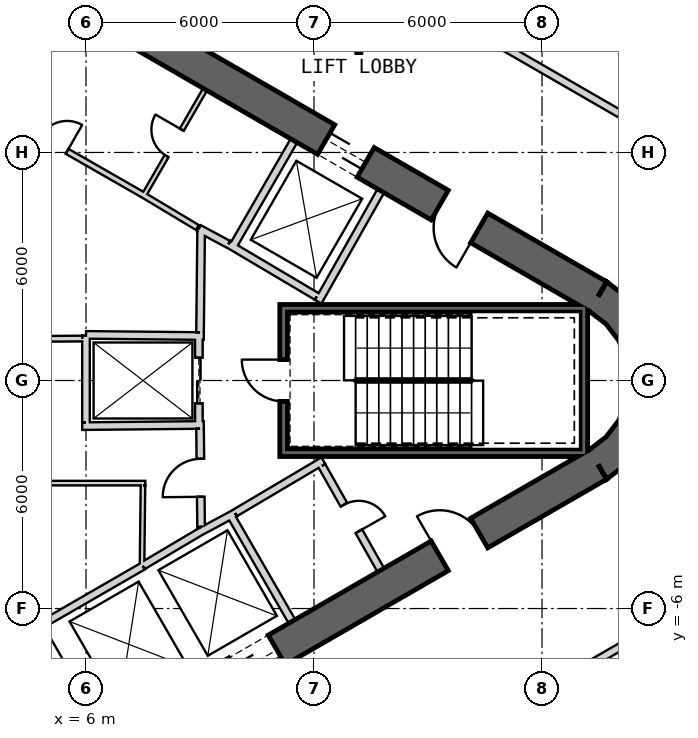
"""IFC4 building model, lengths in metres.
Left out: names, types, materials, properties, quantities, classifications, styles, units other than length and angle.
Written with IfcOpenShell. Run it as: python <this file> out.ifc"""

import sys

from ifc_helpers import new_model, si_unit, direction, frame, frame_2d, origin, place, context, subcontext, project, spatial, polyline, rectangle, outline, extrude, element, fill, save


model = new_model("IFC4")
c1 = context("Model", 3, precision=1e-05, world=origin(), true_north=direction((0.0, 1.0)))
c2 = subcontext(c1, "Body", "Model", "MODEL_VIEW")
j1 = project(units=[si_unit("LENGTHUNIT", "METRE"), si_unit("PLANEANGLEUNIT", "RADIAN")], contexts=[c1])
p1 = place(None, origin())
s1 = spatial("IfcSite", under=j1, at=p1, CompositionType="ELEMENT")
p2 = place(p1, origin())
s2 = spatial("IfcBuilding", under=s1, at=p2, CompositionType="ELEMENT")
p3 = place(p2, frame((0.0, 0.0, 265.2)))
s3 = spatial("IfcBuildingStorey", under=s2, at=p3, CompositionType="ELEMENT", Elevation=265.2)
p4 = place(p3, frame((19.475, 2.208, 0.0), z_axis=(0.0, 0.0, 1.0), x_axis=(-0.866028369851, 0.499994862586, 0.0)))
e1 = element("IfcWall", 1, at=p4, inside=s3, PredefinedType="SHEAR", context=c2, shape_type="SweptSolid", body=[
    extrude(rectangle(XDim=31.523, YDim=0.9, at=frame_2d((15.762, 0.0))), origin(), (0.0, 0.0, 1.0), 4.0),
])
p5 = place(p4, frame((7.062, 0.0, 0.0)))
e2 = element("IfcOpeningElement", 2, at=p5, cuts=e1, PredefinedType="OPENING", context=c2, shape_type="SweptSolid", body=[
    extrude(rectangle(XDim=1.2, YDim=2.4, at=frame_2d((0.6, 1.2))), frame((0.0, 0.46, 0.0), z_axis=(0.0, -1.0, 0.0), x_axis=(1.0, 0.0, 0.0)), (0.0, 0.0, 1.0), 0.92),
])
p6 = place(p4, frame((3.612, 0.0, 0.0)))
e3 = element("IfcOpeningElement", 3, at=p6, cuts=e1, PredefinedType="OPENING", context=c2, shape_type="SweptSolid", body=[
    extrude(rectangle(XDim=1.2, YDim=2.4, at=frame_2d((0.6, 1.2))), frame((0.0, 0.46, 0.0), z_axis=(0.0, -1.0, 0.0), x_axis=(1.0, 0.0, 0.0)), (0.0, 0.0, 1.0), 0.92),
])
p7 = place(p4, frame((26.712, 0.0, 0.0)))
e4 = element("IfcOpeningElement", 4, at=p7, cuts=e1, PredefinedType="OPENING", context=c2, shape_type="SweptSolid", body=[
    extrude(rectangle(XDim=1.2, YDim=2.4, at=frame_2d((0.6, 1.2))), frame((0.0, 0.46, 0.0), z_axis=(0.0, -1.0, 0.0), x_axis=(1.0, 0.0, 0.0)), (0.0, 0.0, 1.0), 0.92),
])
p8 = place(p3, frame((-7.825, -17.97, 0.0), z_axis=(0.0, 0.0, 1.0), x_axis=(0.866028369851, 0.499994862586, 0.0)))
e5 = element("IfcWall", 5, at=p8, inside=s3, PredefinedType="SHEAR", context=c2, shape_type="SweptSolid", body=[
    extrude(rectangle(XDim=31.523, YDim=0.9, at=frame_2d((15.762, 0.0))), origin(), (0.0, 0.0, 1.0), 4.0),
])
p9 = place(p8, frame((7.062, 0.0, 0.0)))
e6 = element("IfcOpeningElement", 6, at=p9, cuts=e5, PredefinedType="OPENING", context=c2, shape_type="SweptSolid", body=[
    extrude(rectangle(XDim=1.2, YDim=2.4, at=frame_2d((0.6, 1.2))), frame((0.0, 0.46, 0.0), z_axis=(0.0, -1.0, 0.0), x_axis=(1.0, 0.0, 0.0)), (0.0, 0.0, 1.0), 0.92),
])
p10 = place(p8, frame((9.762, 0.0, 0.0)))
e7 = element("IfcOpeningElement", 7, at=p10, cuts=e5, PredefinedType="OPENING", context=c2, shape_type="SweptSolid", body=[
    extrude(rectangle(XDim=1.2, YDim=2.4, at=frame_2d((0.6, 1.2))), frame((0.0, 0.46, 0.0), z_axis=(0.0, -1.0, 0.0), x_axis=(1.0, 0.0, 0.0)), (0.0, 0.0, 1.0), 0.92),
])
p11 = place(p8, frame((12.462, 0.0, 0.0)))
e8 = element("IfcOpeningElement", 8, at=p11, cuts=e5, PredefinedType="OPENING", context=c2, shape_type="SweptSolid", body=[
    extrude(rectangle(XDim=1.2, YDim=2.4, at=frame_2d((0.6, 1.2))), frame((0.0, 0.46, 0.0), z_axis=(0.0, -1.0, 0.0), x_axis=(1.0, 0.0, 0.0)), (0.0, 0.0, 1.0), 0.92),
])
p12 = place(p8, frame((15.162, 0.0, 0.0)))
e9 = element("IfcOpeningElement", 9, at=p12, cuts=e5, PredefinedType="OPENING", context=c2, shape_type="SweptSolid", body=[
    extrude(rectangle(XDim=1.2, YDim=2.4, at=frame_2d((0.6, 1.2))), frame((0.0, 0.46, 0.0), z_axis=(0.0, -1.0, 0.0), x_axis=(1.0, 0.0, 0.0)), (0.0, 0.0, 1.0), 0.92),
])
p13 = place(p8, frame((17.862, 0.0, 0.0)))
e10 = element("IfcOpeningElement", 10, at=p13, cuts=e5, PredefinedType="OPENING", context=c2, shape_type="SweptSolid", body=[
    extrude(rectangle(XDim=1.2, YDim=2.4, at=frame_2d((0.6, 1.2))), frame((0.0, 0.46, 0.0), z_axis=(0.0, -1.0, 0.0), x_axis=(1.0, 0.0, 0.0)), (0.0, 0.0, 1.0), 0.92),
])
p14 = place(p8, frame((20.562, 0.0, 0.0)))
e11 = element("IfcOpeningElement", 11, at=p14, cuts=e5, PredefinedType="OPENING", context=c2, shape_type="SweptSolid", body=[
    extrude(rectangle(XDim=1.2, YDim=2.4, at=frame_2d((0.6, 1.2))), frame((0.0, 0.46, 0.0), z_axis=(0.0, -1.0, 0.0), x_axis=(1.0, 0.0, 0.0)), (0.0, 0.0, 1.0), 0.92),
])
p15 = place(p8, frame((26.712, 0.0, 0.0)))
e12 = element("IfcOpeningElement", 12, at=p15, cuts=e5, PredefinedType="OPENING", context=c2, shape_type="SweptSolid", body=[
    extrude(rectangle(XDim=1.2, YDim=2.4, at=frame_2d((0.6, 1.2))), frame((0.0, 0.46, 0.0), z_axis=(0.0, -1.0, 0.0), x_axis=(1.0, 0.0, 0.0)), (0.0, 0.0, 1.0), 0.92),
])
p16 = place(p8, frame((3.612, 0.0, 0.0)))
e13 = element("IfcOpeningElement", 13, at=p16, cuts=e5, PredefinedType="OPENING", context=c2, shape_type="SweptSolid", body=[
    extrude(rectangle(XDim=1.2, YDim=2.4, at=frame_2d((0.6, 1.2))), frame((0.0, 0.46, 0.0), z_axis=(0.0, -1.0, 0.0), x_axis=(1.0, 0.0, 0.0)), (0.0, 0.0, 1.0), 0.92),
])
p17 = place(p3, origin())
e14 = element("IfcWall", 14, at=p17, inside=s3, PredefinedType="SHEAR", context=c2, shape_type="SweptSolid", body=[
    extrude(outline(polyline([(19.7, -2.598), (20.321, -2.121), (20.798, -1.5), (21.098, -0.777), (21.2, 0.0), (21.098, 0.777), (20.798, 1.5), (20.321, 2.121), (19.7, 2.598), (19.25, 1.819), (19.685, 1.485), (20.019, 1.05), (20.229, 0.543), (20.3, 0.0), (20.229, -0.543), (20.019, -1.05), (19.685, -1.485), (19.25, -1.819), (19.7, -2.598)])), origin(), (0.0, 0.0, 1.0), 4.0),
])
p18 = place(p3, frame((9.847, 3.495, 0.0), z_axis=(0.0, 0.0, 1.0), x_axis=(0.499984717929, 0.866034226713, 0.0)))
e15 = element("IfcWall", 15, at=p18, inside=s3, PredefinedType="PLUMBINGWALL", context=c2, shape_type="SweptSolid", body=[
    extrude(rectangle(XDim=3.25, YDim=0.2, at=frame_2d((1.625, 0.0))), origin(), (0.0, 0.0, 1.0), 3.7),
])
p19 = place(p3, frame((12.11, 2.073, 0.0), z_axis=(0.0, 0.0, 1.0), x_axis=(0.49196600604, 0.870614408852, 0.0)))
e16 = element("IfcWall", 16, at=p19, inside=s3, PredefinedType="PLUMBINGWALL", context=c2, shape_type="SweptSolid", body=[
    extrude(rectangle(XDim=3.35, YDim=0.2, at=frame_2d((1.675, 0.0))), origin(), (0.0, 0.0, 1.0), 3.7),
])
p20 = place(p3, frame((12.073, 2.211, 0.0), z_axis=(0.0, 0.0, 1.0), x_axis=(-0.860414880418, 0.509594185166, 0.0)))
e17 = element("IfcWall", 17, at=p20, inside=s3, PredefinedType="PLUMBINGWALL", context=c2, shape_type="SweptSolid", body=[
    extrude(rectangle(XDim=2.7, YDim=0.2, at=frame_2d((1.35, 0.0))), origin(), (0.0, 0.0, 1.0), 3.7),
])
p21 = place(p3, frame((0.483, -8.936, 0.0), z_axis=(0.0, 0.0, 1.0), x_axis=(0.866030989016, 0.499990325971, 0.0)))
e18 = element("IfcWall", 18, at=p21, inside=s3, PredefinedType="PLUMBINGWALL", context=c2, shape_type="SweptSolid", body=[
    extrude(rectangle(XDim=8.1, YDim=0.2, at=frame_2d((4.05, 0.0))), origin(), (0.0, 0.0, 1.0), 3.7),
])
p22 = place(p3, frame((9.795, -3.525, 0.0), z_axis=(0.0, 0.0, 1.0), x_axis=(0.499984717929, -0.866034226713, 0.0)))
e19 = element("IfcWall", 19, at=p22, inside=s3, PredefinedType="PLUMBINGWALL", context=c2, shape_type="SweptSolid", body=[
    extrude(rectangle(XDim=3.25, YDim=0.2, at=frame_2d((1.625, 0.0))), origin(), (0.0, 0.0, 1.0), 3.7),
])
p23 = place(p3, frame((8.974, -3.999, 0.0), z_axis=(0.0, 0.0, 1.0), x_axis=(0.880907015104, 0.473289373154, 0.0)))
e20 = element("IfcWall", 20, at=p23, inside=s3, PredefinedType="PLUMBINGWALL", context=c2, shape_type="SweptSolid", body=[
    extrude(rectangle(XDim=1.078, YDim=0.2, at=frame_2d((0.539, 0.0))), origin(), (0.0, 0.0, 1.0), 3.7),
])
p24 = place(p3, frame((7.493, -4.878, 0.0), z_axis=(0.0, 0.0, 1.0), x_axis=(0.859981807212, 0.510324691999, 0.0)))
e21 = element("IfcWall", 21, at=p24, inside=s3, PredefinedType="PLUMBINGWALL", context=c2, shape_type="SweptSolid", body=[
    extrude(rectangle(XDim=1.845, YDim=0.2, at=frame_2d((0.922, 0.0))), origin(), (0.0, 0.0, 1.0), 3.7),
])
p25 = place(p3, frame((19.2, 1.9, -0.3), z_axis=(0.0, 0.0, 1.0), x_axis=(-1.0, 0.0, 0.0)))
e22 = element("IfcWall", 22, at=p25, inside=s3, PredefinedType="SHEAR", context=c2, shape_type="SweptSolid", body=[
    extrude(rectangle(XDim=8.1, YDim=0.2, at=frame_2d((4.05, 0.0))), origin(), (0.0, 0.0, 1.0), 4.0),
])
p26 = place(p3, frame((19.1, -2.0, -0.3), z_axis=(0.0, 0.0, 1.0), x_axis=(0.0, 1.0, 0.0)))
e23 = element("IfcWall", 23, at=p26, inside=s3, PredefinedType="SHEAR", context=c2, shape_type="SweptSolid", body=[
    extrude(rectangle(XDim=3.8, YDim=0.2, at=frame_2d((1.9, 0.0))), origin(), (0.0, 0.0, 1.0), 4.0),
])
p27 = place(p3, frame((11.1, -1.9, -0.3), z_axis=(0.0, 0.0, 1.0), x_axis=(1.0, 0.0, 0.0)))
e24 = element("IfcWall", 24, at=p27, inside=s3, PredefinedType="SHEAR", context=c2, shape_type="SweptSolid", body=[
    extrude(rectangle(XDim=7.9, YDim=0.2, at=frame_2d((3.95, 0.0))), origin(), (0.0, 0.0, 1.0), 4.0),
])
p28 = place(p3, frame((11.2, -1.8, -0.3), z_axis=(0.0, 0.0, 1.0), x_axis=(0.0, 1.0, 0.0)))
e25 = element("IfcWall", 25, at=p28, inside=s3, PredefinedType="SHEAR", context=c2, shape_type="SweptSolid", body=[
    extrude(rectangle(XDim=3.6, YDim=0.2, at=frame_2d((1.8, 0.0))), origin(), (0.0, 0.0, 1.0), 4.0),
])
p29 = place(p28, frame((1.25, 0.0, 0.3)))
e26 = element("IfcOpeningElement", 26, at=p29, cuts=e25, PredefinedType="OPENING", context=c2, shape_type="SweptSolid", body=[
    extrude(rectangle(XDim=1.1, YDim=2.1, at=frame_2d((0.55, 1.05))), frame((0.0, 0.11, 0.0), z_axis=(0.0, -1.0, 0.0), x_axis=(1.0, 0.0, 0.0)), (0.0, 0.0, 1.0), 0.22),
])
p30 = place(p3, frame((8.97, 1.2, 0.0), z_axis=(0.0, 0.0, 1.0), x_axis=(0.0, -1.0, 0.0)))
e27 = element("IfcWall", 27, at=p30, inside=s3, PredefinedType="PLUMBINGWALL", context=c2, shape_type="SweptSolid", body=[
    extrude(rectangle(XDim=2.4, YDim=0.2, at=frame_2d((1.2, 0.0))), origin(), (0.0, 0.0, 1.0), 3.7),
])
p31 = place(p30, frame((0.6, 0.0, 0.0)))
e28 = element("IfcOpeningElement", 28, at=p31, cuts=e27, PredefinedType="OPENING", context=c2, shape_type="SweptSolid", body=[
    extrude(rectangle(XDim=1.2, YDim=2.4, at=frame_2d((0.6, 1.2))), frame((0.0, 0.11, 0.0), z_axis=(0.0, -1.0, 0.0), x_axis=(1.0, 0.0, 0.0)), (0.0, 0.0, 1.0), 0.22),
])
p32 = place(p3, frame((6.0, 1.2, 0.0), z_axis=(0.0, 0.0, 1.0), x_axis=(0.999949988, -0.010001074852, 0.0)))
e29 = element("IfcWall", 29, at=p32, inside=s3, PredefinedType="PLUMBINGWALL", context=c2, shape_type="SweptSolid", body=[
    extrude(rectangle(XDim=3.1, YDim=0.2, at=frame_2d((1.55, 0.0))), origin(), (0.0, 0.0, 1.0), 3.7),
])
p33 = place(p3, frame((5.9, -1.201, 0.0), z_axis=(0.0, 0.0, 1.0), x_axis=(0.999950064753, 0.009993397809, 0.0)))
e30 = element("IfcWall", 30, at=p33, inside=s3, PredefinedType="PLUMBINGWALL", context=c2, shape_type="SweptSolid", body=[
    extrude(rectangle(XDim=3.2, YDim=0.2, at=frame_2d((1.6, 0.0))), origin(), (0.0, 0.0, 1.0), 3.7),
])
p34 = place(p3, frame((6.0, -1.1, 0.0), z_axis=(0.0, 0.0, 1.0), x_axis=(0.0, 1.0, 0.0)))
e31 = element("IfcWall", 31, at=p34, inside=s3, PredefinedType="PLUMBINGWALL", context=c2, shape_type="SweptSolid", body=[
    extrude(rectangle(XDim=2.28, YDim=0.2, at=frame_2d((1.14, 0.0))), origin(), (0.0, 0.0, 1.0), 3.7),
])
p35 = place(p3, frame((7.508, 4.845, 0.0), z_axis=(0.0, 0.0, 1.0), x_axis=(0.500017246033, 0.866015446554, 0.0)))
e32 = element("IfcWall", 32, at=p35, inside=s3, PredefinedType="PARTITIONING", context=c2, shape_type="SweptSolid", body=[
    extrude(rectangle(XDim=3.25, YDim=0.12, at=frame_2d((1.625, 0.0))), origin(), (0.0, 0.0, 1.0), 3.7),
])
p36 = place(p35, frame((1.225, 0.0, 0.0)))
e33 = element("IfcOpeningElement", 33, at=p36, cuts=e32, PredefinedType="OPENING", context=c2, shape_type="SweptSolid", body=[
    extrude(rectangle(XDim=0.8, YDim=2.1, at=frame_2d((0.4, 1.05))), frame((0.0, 0.07, 0.0), z_axis=(0.0, -1.0, 0.0), x_axis=(1.0, 0.0, 0.0)), (0.0, 0.0, 1.0), 0.14),
])
p37 = place(p3, frame((8.974, 3.999, 0.0), z_axis=(0.0, 0.0, 1.0), x_axis=(0.880917147855, -0.473270513147, 0.0)))
e34 = element("IfcWall", 34, at=p37, inside=s3, PredefinedType="PARTITIONING", context=c2, shape_type="SweptSolid", body=[
    extrude(rectangle(XDim=0.878, YDim=0.2, at=frame_2d((0.439, 0.0))), origin(), (0.0, 0.0, 1.0), 3.7),
])
p38 = place(p3, frame((8.931, 4.026, 0.0), z_axis=(0.0, 0.0, 1.0), x_axis=(-0.857531586833, 0.514431314738, 0.0)))
e35 = element("IfcWall", 35, at=p38, inside=s3, PredefinedType="PLUMBINGWALL", context=c2, shape_type="SweptSolid", body=[
    extrude(rectangle(XDim=1.671, YDim=0.15, at=frame_2d((0.836, 0.0))), origin(), (0.0, 0.0, 1.0), 3.7),
])
p39 = place(p3, frame((7.497, 4.886, 0.0), z_axis=(0.0, 0.0, 1.0), x_axis=(-0.867541725638, 0.497364407931, 0.0)))
e36 = element("IfcWall", 36, at=p39, inside=s3, PredefinedType="PLUMBINGWALL", context=c2, shape_type="SweptSolid", body=[
    extrude(rectangle(XDim=9.822, YDim=0.15, at=frame_2d((4.911, 0.0))), origin(), (0.0, 0.0, 1.0), 3.7),
])
p40 = place(p39, frame((2.3, 0.0, 0.0)))
e37 = element("IfcOpeningElement", 37, at=p40, cuts=e36, PredefinedType="OPENING", context=c2, shape_type="SweptSolid", body=[
    extrude(rectangle(XDim=0.8, YDim=2.1, at=frame_2d((0.4, 1.05))), frame((0.0, 0.085, 0.0), z_axis=(0.0, -1.0, 0.0), x_axis=(1.0, 0.0, 0.0)), (0.0, 0.0, 1.0), 0.17),
])
p41 = place(p3, frame((12.245, -2.109, 0.0), z_axis=(0.0, 0.0, 1.0), x_axis=(-0.860414880418, -0.509594185166, 0.0)))
e38 = element("IfcWall", 38, at=p41, inside=s3, PredefinedType="PARTITIONING", context=c2, shape_type="SweptSolid", body=[
    extrude(rectangle(XDim=2.7, YDim=0.2, at=frame_2d((1.35, 0.0))), origin(), (0.0, 0.0, 1.0), 3.7),
])
p42 = place(p3, frame((13.758, -4.99, 0.0), z_axis=(0.0, 0.0, 1.0), x_axis=(-0.491993409184, 0.87059892334, 0.0)))
e39 = element("IfcWall", 39, at=p42, inside=s3, PredefinedType="PARTITIONING", context=c2, shape_type="SweptSolid", body=[
    extrude(rectangle(XDim=3.15, YDim=0.2, at=frame_2d((1.575, 0.0))), origin(), (0.0, 0.0, 1.0), 3.7),
])
p43 = place(p42, frame((1.175, 0.0, 0.0)))
e40 = element("IfcOpeningElement", 40, at=p43, cuts=e39, PredefinedType="OPENING", context=c2, shape_type="SweptSolid", body=[
    extrude(rectangle(XDim=0.8, YDim=2.1, at=frame_2d((0.4, 1.05))), frame((0.0, 0.11, 0.0), z_axis=(0.0, -1.0, 0.0), x_axis=(1.0, 0.0, 0.0)), (0.0, 0.0, 1.0), 0.22),
])
p44 = place(p3, frame((9.001, 1.27, 0.0), z_axis=(0.0, 0.0, 1.0), x_axis=(0.010751103362, 0.999942205218, 0.0)))
e41 = element("IfcWall", 41, at=p44, inside=s3, PredefinedType="PARTITIONING", context=c2, shape_type="SweptSolid", body=[
    extrude(rectangle(XDim=2.725, YDim=0.2, at=frame_2d((1.363, 0.0))), origin(), (0.0, 0.0, 1.0), 3.7),
])
p45 = place(p3, frame((9.029, -3.851, 0.0), z_axis=(0.0, 0.0, 1.0), x_axis=(-0.010783593937, 0.99994185536, 0.0)))
e42 = element("IfcWall", 42, at=p45, inside=s3, PredefinedType="PARTITIONING", context=c2, shape_type="SweptSolid", body=[
    extrude(rectangle(XDim=2.581, YDim=0.2, at=frame_2d((1.291, 0.0))), origin(), (0.0, 0.0, 1.0), 3.7),
])
p46 = place(p45, frame((0.791, 0.0, 0.0)))
e43 = element("IfcOpeningElement", 43, at=p46, cuts=e42, PredefinedType="OPENING", context=c2, shape_type="SweptSolid", body=[
    extrude(rectangle(XDim=1.0, YDim=2.1, at=frame_2d((0.5, 1.05))), frame((0.0, 0.11, 0.0), z_axis=(0.0, -1.0, 0.0), x_axis=(1.0, 0.0, 0.0)), (0.0, 0.0, 1.0), 0.22),
])
p47 = place(p3, frame((1.778, 1.074, 0.0), z_axis=(0.0, 0.0, 1.0), x_axis=(0.999973898196, 0.007225159347, 0.0)))
e44 = element("IfcWall", 44, at=p47, inside=s3, PredefinedType="PLUMBINGWALL", context=c2, shape_type="SweptSolid", body=[
    extrude(rectangle(XDim=4.122, YDim=0.15, at=frame_2d((2.061, 0.0))), origin(), (0.0, 0.0, 1.0), 3.7),
])
p48 = place(p47, frame((1.725, 0.0, 0.0)))
e45 = element("IfcOpeningElement", 45, at=p48, cuts=e44, PredefinedType="OPENING", context=c2, shape_type="SweptSolid", body=[
    extrude(rectangle(XDim=0.8, YDim=2.1, at=frame_2d((0.4, 1.05))), frame((0.0, 0.085, 0.0), z_axis=(0.0, -1.0, 0.0), x_axis=(1.0, 0.0, 0.0)), (0.0, 0.0, 1.0), 0.17),
])
p49 = place(p3, frame((7.56, -2.7, 0.0), z_axis=(0.0, 0.0, 1.0), x_axis=(-1.0, 0.0, 0.0)))
e46 = element("IfcWall", 46, at=p49, inside=s3, PredefinedType="PARTITIONING", context=c2, shape_type="SweptSolid", body=[
    extrude(rectangle(XDim=3.0, YDim=0.12, at=frame_2d((1.5, 0.0))), origin(), (0.0, 0.0, 1.0), 3.7),
])
p50 = place(p3, frame((7.475, -4.865, 0.0), z_axis=(0.0, 0.0, 1.0), x_axis=(0.011716133148, 0.999931363757, 0.0)))
e47 = element("IfcWall", 47, at=p50, inside=s3, PredefinedType="PARTITIONING", context=c2, shape_type="SweptSolid", body=[
    extrude(rectangle(XDim=2.105, YDim=0.12, at=frame_2d((1.052, 0.0))), origin(), (0.0, 0.0, 1.0), 3.7),
])
p51 = place(p3, frame((22.466, 5.62, 0.0), z_axis=(0.0, 0.0, 1.0), x_axis=(-0.866024234898, 0.500002024564, 0.0)))
e48 = element("IfcWall", 48, at=p51, inside=s3, PredefinedType="PARTITIONING", context=c2, shape_type="SweptSolid", body=[
    extrude(rectangle(XDim=12.296, YDim=0.2, at=frame_2d((6.148, 0.0))), origin(), (0.0, 0.0, 1.0), 2.98),
])
p52 = place(p3, frame((11.817, -11.768, 0.0), z_axis=(0.0, 0.0, 1.0), x_axis=(0.866029971876, 0.49999208775, 0.0)))
e49 = element("IfcWall", 49, at=p52, inside=s3, PredefinedType="PARTITIONING", context=c2, shape_type="SweptSolid", body=[
    extrude(rectangle(XDim=12.096, YDim=0.2, at=frame_2d((6.048, 0.0))), origin(), (0.0, 0.0, 1.0), 2.98),
])
p53 = place(p29, origin())
e50 = element("IfcDoor", 50, at=p53, inside=s3, OperationType="SINGLE_SWING_RIGHT", PredefinedType="USERDEFINED", context=c2, shape_type="SweptSolid", body=[
    extrude(rectangle(XDim=1.1, YDim=2.1, at=frame_2d((0.55, 1.05))), frame((0.0, 0.025, 0.0), z_axis=(0.0, -1.0, 0.0), x_axis=(1.0, 0.0, 0.0)), (0.0, 0.0, 1.0), 0.05),
])
fill(e26, e50)
p54 = place(p46, origin())
e51 = element("IfcDoor", 51, at=p54, inside=s3, OperationType="SINGLE_SWING_RIGHT", PredefinedType="USERDEFINED", context=c2, shape_type="SweptSolid", body=[
    extrude(rectangle(XDim=1.0, YDim=2.1, at=frame_2d((0.5, 1.05))), frame((0.0, 0.025, 0.0), z_axis=(0.0, -1.0, 0.0), x_axis=(1.0, 0.0, 0.0)), (0.0, 0.0, 1.0), 0.05),
])
fill(e43, e51)
p55 = place(p31, origin())
e52 = element("IfcDoor", 52, at=p55, inside=s3, OperationType="SLIDING_TO_LEFT", PredefinedType="USERDEFINED", context=c2, shape_type="SweptSolid", body=[
    extrude(rectangle(XDim=1.2, YDim=2.4, at=frame_2d((0.6, 1.2))), frame((0.0, 0.025, 0.0), z_axis=(0.0, -1.0, 0.0), x_axis=(1.0, 0.0, 0.0)), (0.0, 0.0, 1.0), 0.05),
])
fill(e28, e52)
p56 = place(p36, origin())
e53 = element("IfcDoor", 53, at=p56, inside=s3, OperationType="SINGLE_SWING_RIGHT", PredefinedType="USERDEFINED", context=c2, shape_type="SweptSolid", body=[
    extrude(rectangle(XDim=0.8, YDim=2.1, at=frame_2d((0.4, 1.05))), frame((0.0, 0.025, 0.0), z_axis=(0.0, -1.0, 0.0), x_axis=(1.0, 0.0, 0.0)), (0.0, 0.0, 1.0), 0.05),
])
fill(e33, e53)
p57 = place(p43, origin())
e54 = element("IfcDoor", 54, at=p57, inside=s3, OperationType="SINGLE_SWING_LEFT", PredefinedType="USERDEFINED", context=c2, shape_type="SweptSolid", body=[
    extrude(rectangle(XDim=0.8, YDim=2.1, at=frame_2d((0.4, 1.05))), frame((0.0, 0.025, 0.0), z_axis=(0.0, -1.0, 0.0), x_axis=(1.0, 0.0, 0.0)), (0.0, 0.0, 1.0), 0.05),
])
fill(e40, e54)
p58 = place(p40, origin())
e55 = element("IfcDoor", 55, at=p58, inside=s3, OperationType="SINGLE_SWING_LEFT", PredefinedType="USERDEFINED", context=c2, shape_type="SweptSolid", body=[
    extrude(rectangle(XDim=0.8, YDim=2.1, at=frame_2d((0.4, 1.05))), frame((0.0, 0.025, 0.0), z_axis=(0.0, -1.0, 0.0), x_axis=(1.0, 0.0, 0.0)), (0.0, 0.0, 1.0), 0.05),
])
fill(e37, e55)
p59 = place(p5, origin())
e56 = element("IfcDoor", 56, at=p59, inside=s3, OperationType="SLIDING_TO_LEFT", PredefinedType="USERDEFINED", context=c2, shape_type="SweptSolid", body=[
    extrude(rectangle(XDim=1.2, YDim=2.4, at=frame_2d((0.6, 1.2))), frame((0.0, 0.025, 0.0), z_axis=(0.0, -1.0, 0.0), x_axis=(1.0, 0.0, 0.0)), (0.0, 0.0, 1.0), 0.05),
])
fill(e2, e56)
p60 = place(p14, origin())
e57 = element("IfcDoor", 57, at=p60, inside=s3, OperationType="SLIDING_TO_LEFT", PredefinedType="USERDEFINED", context=c2, shape_type="SweptSolid", body=[
    extrude(rectangle(XDim=1.2, YDim=2.4, at=frame_2d((0.6, 1.2))), frame((0.0, 0.025, 0.0), z_axis=(0.0, -1.0, 0.0), x_axis=(1.0, 0.0, 0.0)), (0.0, 0.0, 1.0), 0.05),
])
fill(e11, e57)
p61 = place(p15, origin())
e58 = element("IfcDoor", 58, at=p61, inside=s3, OperationType="SINGLE_SWING_RIGHT", PredefinedType="USERDEFINED", context=c2, shape_type="SweptSolid", body=[
    extrude(rectangle(XDim=1.2, YDim=2.4, at=frame_2d((0.6, 1.2))), frame((0.0, 0.025, 0.0), z_axis=(0.0, -1.0, 0.0), x_axis=(1.0, 0.0, 0.0)), (0.0, 0.0, 1.0), 0.05),
])
fill(e12, e58)
p62 = place(p6, origin())
e59 = element("IfcDoor", 59, at=p62, inside=s3, OperationType="SINGLE_SWING_LEFT", PredefinedType="USERDEFINED", context=c2, shape_type="SweptSolid", body=[
    extrude(rectangle(XDim=1.2, YDim=2.4, at=frame_2d((0.6, 1.2))), frame((0.0, 0.025, 0.0), z_axis=(0.0, -1.0, 0.0), x_axis=(1.0, 0.0, 0.0)), (0.0, 0.0, 1.0), 0.05),
])
fill(e3, e59)
save(model, sys.argv[1])
